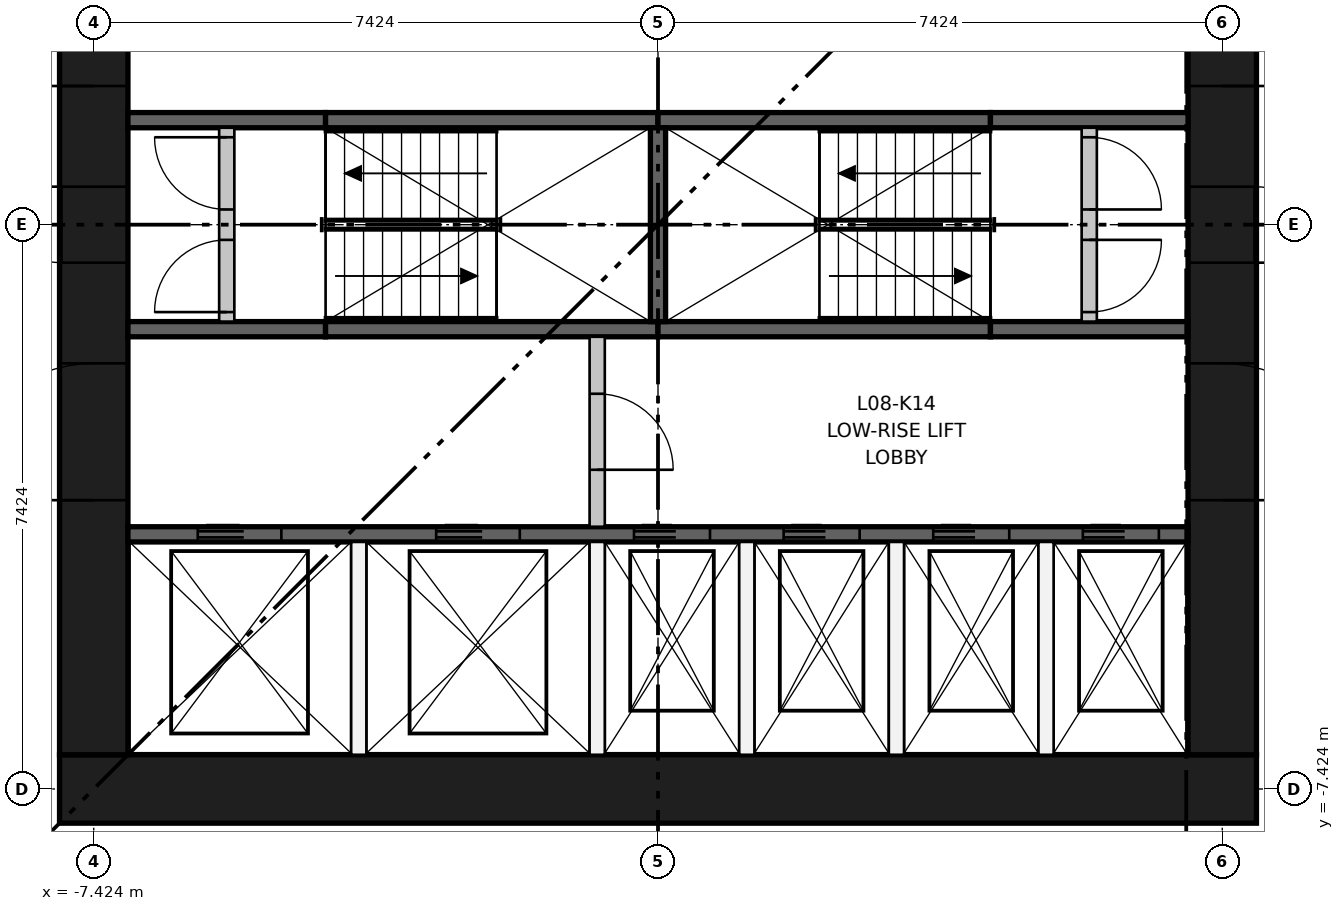
"""IFC4 building model, lengths in metres.
Left out: names, types, materials, properties, quantities, classifications, styles, units other than length and angle.
Written with IfcOpenShell. Run it as: python <this file> out.ifc"""

import sys

from ifc_helpers import new_model, si_unit, direction, frame, frame_2d, origin, place, context, subcontext, project, spatial, rectangle, extrude, element, fill, save


model = new_model("IFC4")
c1 = context("Model", 3, precision=1e-05, world=origin(), true_north=direction((0.0, 1.0)))
c2 = subcontext(c1, "Body", "Model", "MODEL_VIEW")
j1 = project(units=[si_unit("LENGTHUNIT", "METRE"), si_unit("PLANEANGLEUNIT", "RADIAN")], contexts=[c1])
p1 = place(None, origin())
s1 = spatial("IfcSite", under=j1, at=p1, CompositionType="ELEMENT")
p2 = place(p1, origin())
s2 = spatial("IfcBuilding", under=s1, at=p2, CompositionType="ELEMENT")
p3 = place(p2, frame((0.0, 0.0, 33.5)))
s3 = spatial("IfcBuildingStorey", under=s2, at=p3, CompositionType="ELEMENT", Elevation=33.5)
p4 = place(p3, frame((-7.874, -7.424, 0.0), z_axis=(0.0, 0.0, 1.0), x_axis=(1.0, 0.0, 0.0)))
e1 = element("IfcWall", 1, at=p4, inside=s3, PredefinedType="SHEAR", context=c2, shape_type="SweptSolid", body=[
    extrude(rectangle(XDim=15.748, YDim=0.9, at=frame_2d((7.874, 0.0))), origin(), (0.0, 0.0, 1.0), 3.65),
])
p5 = place(p3, frame((-7.424, -6.974, 0.0), z_axis=(0.0, 0.0, 1.0), x_axis=(0.0, 1.0, 0.0)))
e2 = element("IfcWall", 2, at=p5, inside=s3, PredefinedType="SHEAR", context=c2, shape_type="SweptSolid", body=[
    extrude(rectangle(XDim=13.948, YDim=0.9, at=frame_2d((6.974, 0.0))), origin(), (0.0, 0.0, 1.0), 3.65),
])
p6 = place(p5, frame((6.474, 0.0, 0.0)))
e3 = element("IfcOpeningElement", 3, at=p6, cuts=e2, PredefinedType="OPENING", context=c2, shape_type="SweptSolid", body=[
    extrude(rectangle(XDim=1.0, YDim=2.1, at=frame_2d((0.5, 1.05))), frame((0.0, 0.46, 0.0), z_axis=(0.0, -1.0, 0.0), x_axis=(1.0, 0.0, 0.0)), (0.0, 0.0, 1.0), 0.92),
])
p7 = place(p5, frame((3.35, 0.0, 0.0)))
e4 = element("IfcOpeningElement", 4, at=p7, cuts=e2, PredefinedType="OPENING", context=c2, shape_type="SweptSolid", body=[
    extrude(rectangle(XDim=1.8, YDim=2.1, at=frame_2d((0.9, 1.05))), frame((0.0, 0.46, 0.0), z_axis=(0.0, -1.0, 0.0), x_axis=(1.0, 0.0, 0.0)), (0.0, 0.0, 1.0), 0.92),
])
p8 = place(p5, frame((8.799, 0.0, 0.0)))
e5 = element("IfcOpeningElement", 5, at=p8, cuts=e2, PredefinedType="OPENING", context=c2, shape_type="SweptSolid", body=[
    extrude(rectangle(XDim=1.8, YDim=2.1, at=frame_2d((0.9, 1.05))), frame((0.0, 0.46, 0.0), z_axis=(0.0, -1.0, 0.0), x_axis=(1.0, 0.0, 0.0)), (0.0, 0.0, 1.0), 0.92),
])
p9 = place(p5, frame((11.974, 0.0, 0.0)))
e6 = element("IfcOpeningElement", 6, at=p9, cuts=e2, PredefinedType="OPENING", context=c2, shape_type="SweptSolid", body=[
    extrude(rectangle(XDim=1.0, YDim=2.1, at=frame_2d((0.5, 1.05))), frame((0.0, 0.46, 0.0), z_axis=(0.0, -1.0, 0.0), x_axis=(1.0, 0.0, 0.0)), (0.0, 0.0, 1.0), 0.92),
])
p10 = place(p3, frame((7.424, -6.974, 0.0), z_axis=(0.0, 0.0, 1.0), x_axis=(0.0, 1.0, 0.0)))
e7 = element("IfcWall", 7, at=p10, inside=s3, PredefinedType="SHEAR", context=c2, shape_type="SweptSolid", body=[
    extrude(rectangle(XDim=13.948, YDim=0.9, at=frame_2d((6.974, 0.0))), origin(), (0.0, 0.0, 1.0), 3.65),
])
p11 = place(p10, frame((6.474, 0.0, 0.0)))
e8 = element("IfcOpeningElement", 8, at=p11, cuts=e7, PredefinedType="OPENING", context=c2, shape_type="SweptSolid", body=[
    extrude(rectangle(XDim=1.0, YDim=2.1, at=frame_2d((0.5, 1.05))), frame((0.0, 0.46, 0.0), z_axis=(0.0, -1.0, 0.0), x_axis=(1.0, 0.0, 0.0)), (0.0, 0.0, 1.0), 0.92),
])
p12 = place(p10, frame((3.35, 0.0, 0.0)))
e9 = element("IfcOpeningElement", 9, at=p12, cuts=e7, PredefinedType="OPENING", context=c2, shape_type="SweptSolid", body=[
    extrude(rectangle(XDim=1.8, YDim=2.1, at=frame_2d((0.9, 1.05))), frame((0.0, 0.46, 0.0), z_axis=(0.0, -1.0, 0.0), x_axis=(1.0, 0.0, 0.0)), (0.0, 0.0, 1.0), 0.92),
])
p13 = place(p10, frame((8.799, 0.0, 0.0)))
e10 = element("IfcOpeningElement", 10, at=p13, cuts=e7, PredefinedType="OPENING", context=c2, shape_type="SweptSolid", body=[
    extrude(rectangle(XDim=1.8, YDim=2.1, at=frame_2d((0.9, 1.05))), frame((0.0, 0.46, 0.0), z_axis=(0.0, -1.0, 0.0), x_axis=(1.0, 0.0, 0.0)), (0.0, 0.0, 1.0), 0.92),
])
p14 = place(p3, frame((-6.974, -4.074, 0.0), z_axis=(0.0, 0.0, 1.0), x_axis=(1.0, 0.0, 0.0)))
e11 = element("IfcWall", 11, at=p14, inside=s3, PredefinedType="SHEAR", context=c2, shape_type="SweptSolid", body=[
    extrude(rectangle(XDim=13.948, YDim=0.2, at=frame_2d((6.974, 0.0))), origin(), (0.0, 0.0, 1.0), 3.3),
])
p15 = place(p14, frame((0.918, 0.0, 0.0)))
e12 = element("IfcOpeningElement", 12, at=p15, cuts=e11, PredefinedType="OPENING", context=c2, shape_type="SweptSolid", body=[
    extrude(rectangle(XDim=1.1, YDim=2.1, at=frame_2d((0.55, 1.05))), frame((0.0, 0.11, 0.0), z_axis=(0.0, -1.0, 0.0), x_axis=(1.0, 0.0, 0.0)), (0.0, 0.0, 1.0), 0.22),
])
p16 = place(p14, frame((4.055, 0.0, 0.0)))
e13 = element("IfcOpeningElement", 13, at=p16, cuts=e11, PredefinedType="OPENING", context=c2, shape_type="SweptSolid", body=[
    extrude(rectangle(XDim=1.1, YDim=2.1, at=frame_2d((0.55, 1.05))), frame((0.0, 0.11, 0.0), z_axis=(0.0, -1.0, 0.0), x_axis=(1.0, 0.0, 0.0)), (0.0, 0.0, 1.0), 0.22),
])
p17 = place(p14, frame((6.658, 0.0, 0.0)))
e14 = element("IfcOpeningElement", 14, at=p17, cuts=e11, PredefinedType="OPENING", context=c2, shape_type="SweptSolid", body=[
    extrude(rectangle(XDim=1.0, YDim=2.1, at=frame_2d((0.5, 1.05))), frame((0.0, 0.11, 0.0), z_axis=(0.0, -1.0, 0.0), x_axis=(1.0, 0.0, 0.0)), (0.0, 0.0, 1.0), 0.22),
])
p18 = place(p14, frame((8.627, 0.0, 0.0)))
e15 = element("IfcOpeningElement", 15, at=p18, cuts=e11, PredefinedType="OPENING", context=c2, shape_type="SweptSolid", body=[
    extrude(rectangle(XDim=1.0, YDim=2.1, at=frame_2d((0.5, 1.05))), frame((0.0, 0.11, 0.0), z_axis=(0.0, -1.0, 0.0), x_axis=(1.0, 0.0, 0.0)), (0.0, 0.0, 1.0), 0.22),
])
p19 = place(p14, frame((10.595, 0.0, 0.0)))
e16 = element("IfcOpeningElement", 16, at=p19, cuts=e11, PredefinedType="OPENING", context=c2, shape_type="SweptSolid", body=[
    extrude(rectangle(XDim=1.0, YDim=2.1, at=frame_2d((0.5, 1.05))), frame((0.0, 0.11, 0.0), z_axis=(0.0, -1.0, 0.0), x_axis=(1.0, 0.0, 0.0)), (0.0, 0.0, 1.0), 0.22),
])
p20 = place(p14, frame((12.564, 0.0, 0.0)))
e17 = element("IfcOpeningElement", 17, at=p20, cuts=e11, PredefinedType="OPENING", context=c2, shape_type="SweptSolid", body=[
    extrude(rectangle(XDim=1.0, YDim=2.1, at=frame_2d((0.5, 1.05))), frame((0.0, 0.11, 0.0), z_axis=(0.0, -1.0, 0.0), x_axis=(1.0, 0.0, 0.0)), (0.0, 0.0, 1.0), 0.22),
])
p21 = place(p3, frame((-6.974, -1.375, 0.0), z_axis=(0.0, 0.0, 1.0), x_axis=(1.0, 0.0, 0.0)))
e18 = element("IfcWall", 18, at=p21, inside=s3, PredefinedType="SHEAR", context=c2, shape_type="SweptSolid", body=[
    extrude(rectangle(XDim=2.6, YDim=0.2, at=frame_2d((1.3, 0.0))), origin(), (0.0, 0.0, 1.0), 3.3),
])
for number, where, z_axis, x_axis in (
    (19, (-4.374, -1.375, 0.0), (0.0, 0.0, 1.0), (1.0, 0.0, 0.0)),
    (20, (0.0, -1.375, 0.0), (0.0, 0.0, 1.0), (1.0, 0.0, 0.0)),
):
    element("IfcWall", number, at=place(p3, frame(where, z_axis=z_axis, x_axis=x_axis)), inside=s3, PredefinedType="SHEAR", context=c2, shape_type="SweptSolid", body=[
        extrude(rectangle(XDim=4.374, YDim=0.2, at=frame_2d((2.187, 0.0))), origin(), (0.0, 0.0, 1.0), 3.3),
    ])
for number, where, z_axis, x_axis in (
    (21, (4.374, -1.375, 0.0), (0.0, 0.0, 1.0), (1.0, 0.0, 0.0)),
    (22, (-6.974, 1.375, 0.0), (0.0, 0.0, 1.0), (1.0, 0.0, 0.0)),
):
    element("IfcWall", number, at=place(p3, frame(where, z_axis=z_axis, x_axis=x_axis)), inside=s3, PredefinedType="SHEAR", context=c2, shape_type="SweptSolid", body=[
        extrude(rectangle(XDim=2.6, YDim=0.2, at=frame_2d((1.3, 0.0))), origin(), (0.0, 0.0, 1.0), 3.3),
    ])
for number, where, z_axis, x_axis in (
    (23, (-4.374, 1.375, 0.0), (0.0, 0.0, 1.0), (1.0, 0.0, 0.0)),
    (24, (0.0, 1.375, 0.0), (0.0, 0.0, 1.0), (1.0, 0.0, 0.0)),
):
    element("IfcWall", number, at=place(p3, frame(where, z_axis=z_axis, x_axis=x_axis)), inside=s3, PredefinedType="SHEAR", context=c2, shape_type="SweptSolid", body=[
        extrude(rectangle(XDim=4.374, YDim=0.2, at=frame_2d((2.187, 0.0))), origin(), (0.0, 0.0, 1.0), 3.3),
    ])
p22 = place(p3, frame((4.374, 1.375, 0.0), z_axis=(0.0, 0.0, 1.0), x_axis=(1.0, 0.0, 0.0)))
e25 = element("IfcWall", 25, at=p22, inside=s3, PredefinedType="SHEAR", context=c2, shape_type="SweptSolid", body=[
    extrude(rectangle(XDim=2.6, YDim=0.2, at=frame_2d((1.3, 0.0))), origin(), (0.0, 0.0, 1.0), 3.3),
])
p23 = place(p3, frame((0.0, -1.275, 0.0), z_axis=(0.0, 0.0, 1.0), x_axis=(0.0, 1.0, 0.0)))
e26 = element("IfcWall", 26, at=p23, inside=s3, PredefinedType="SHEAR", context=c2, shape_type="SweptSolid", body=[
    extrude(rectangle(XDim=2.55, YDim=0.2, at=frame_2d((1.275, 0.0))), origin(), (0.0, 0.0, 1.0), 3.3),
])
for number, where, z_axis, x_axis in (
    (27, (-3.937, -6.974, 0.0), (0.0, 0.0, 1.0), (0.0, 1.0, 0.0)),
    (28, (-0.8, -6.974, 0.0), (0.0, 0.0, 1.0), (0.0, 1.0, 0.0)),
):
    element("IfcWall", number, at=place(p3, frame(where, z_axis=z_axis, x_axis=x_axis)), inside=s3, PredefinedType="PARTITIONING", context=c2, shape_type="SweptSolid", body=[
        extrude(rectangle(XDim=2.8, YDim=0.2, at=frame_2d((1.4, 0.0))), origin(), (0.0, 0.0, 1.0), 3.3),
    ])
p24 = place(p3, frame((-0.8, -3.974, 0.0), z_axis=(0.0, 0.0, 1.0), x_axis=(0.0, 1.0, 0.0)))
e29 = element("IfcWall", 29, at=p24, inside=s3, PredefinedType="PARTITIONING", context=c2, shape_type="SweptSolid", body=[
    extrude(rectangle(XDim=2.499, YDim=0.2, at=frame_2d((1.25, 0.0))), origin(), (0.0, 0.0, 1.0), 3.3),
])
p25 = place(p24, frame((0.75, 0.0, 0.0)))
e30 = element("IfcOpeningElement", 30, at=p25, cuts=e29, PredefinedType="OPENING", context=c2, shape_type="SweptSolid", body=[
    extrude(rectangle(XDim=1.0, YDim=2.1, at=frame_2d((0.5, 1.05))), frame((0.0, 0.11, 0.0), z_axis=(0.0, -1.0, 0.0), x_axis=(1.0, 0.0, 0.0)), (0.0, 0.0, 1.0), 0.22),
])
for number, where, z_axis, x_axis in (
    (31, (1.168, -6.974, 0.0), (0.0, 0.0, 1.0), (0.0, 1.0, 0.0)),
    (32, (3.137, -6.974, 0.0), (0.0, 0.0, 1.0), (0.0, 1.0, 0.0)),
    (33, (5.105, -6.974, 0.0), (0.0, 0.0, 1.0), (0.0, 1.0, 0.0)),
):
    element("IfcWall", number, at=place(p3, frame(where, z_axis=z_axis, x_axis=x_axis)), inside=s3, PredefinedType="PARTITIONING", context=c2, shape_type="SweptSolid", body=[
        extrude(rectangle(XDim=2.8, YDim=0.2, at=frame_2d((1.4, 0.0))), origin(), (0.0, 0.0, 1.0), 3.3),
    ])
p26 = place(p3, frame((-5.674, -1.275, 0.0), z_axis=(0.0, 0.0, 1.0), x_axis=(0.0, 1.0, 0.0)))
e34 = element("IfcWall", 34, at=p26, inside=s3, PredefinedType="PARTITIONING", context=c2, shape_type="SweptSolid", body=[
    extrude(rectangle(XDim=2.55, YDim=0.2, at=frame_2d((1.275, 0.0))), origin(), (0.0, 0.0, 1.0), 3.3),
])
p27 = place(p26, frame((0.125, 0.0, 0.0)))
e35 = element("IfcOpeningElement", 35, at=p27, cuts=e34, PredefinedType="OPENING", context=c2, shape_type="SweptSolid", body=[
    extrude(rectangle(XDim=0.95, YDim=2.1, at=frame_2d((0.475, 1.05))), frame((0.0, 0.11, 0.0), z_axis=(0.0, -1.0, 0.0), x_axis=(1.0, 0.0, 0.0)), (0.0, 0.0, 1.0), 0.22),
])
p28 = place(p26, frame((1.475, 0.0, 0.0)))
e36 = element("IfcOpeningElement", 36, at=p28, cuts=e34, PredefinedType="OPENING", context=c2, shape_type="SweptSolid", body=[
    extrude(rectangle(XDim=0.95, YDim=2.1, at=frame_2d((0.475, 1.05))), frame((0.0, 0.11, 0.0), z_axis=(0.0, -1.0, 0.0), x_axis=(1.0, 0.0, 0.0)), (0.0, 0.0, 1.0), 0.22),
])
p29 = place(p3, frame((5.674, -1.275, 0.0), z_axis=(0.0, 0.0, 1.0), x_axis=(0.0, 1.0, 0.0)))
e37 = element("IfcWall", 37, at=p29, inside=s3, PredefinedType="PARTITIONING", context=c2, shape_type="SweptSolid", body=[
    extrude(rectangle(XDim=2.55, YDim=0.2, at=frame_2d((1.275, 0.0))), origin(), (0.0, 0.0, 1.0), 3.3),
])
p30 = place(p29, frame((0.125, 0.0, 0.0)))
e38 = element("IfcOpeningElement", 38, at=p30, cuts=e37, PredefinedType="OPENING", context=c2, shape_type="SweptSolid", body=[
    extrude(rectangle(XDim=0.95, YDim=2.1, at=frame_2d((0.475, 1.05))), frame((0.0, 0.11, 0.0), z_axis=(0.0, -1.0, 0.0), x_axis=(1.0, 0.0, 0.0)), (0.0, 0.0, 1.0), 0.22),
])
p31 = place(p29, frame((1.475, 0.0, 0.0)))
e39 = element("IfcOpeningElement", 39, at=p31, cuts=e37, PredefinedType="OPENING", context=c2, shape_type="SweptSolid", body=[
    extrude(rectangle(XDim=0.95, YDim=2.1, at=frame_2d((0.475, 1.05))), frame((0.0, 0.11, 0.0), z_axis=(0.0, -1.0, 0.0), x_axis=(1.0, 0.0, 0.0)), (0.0, 0.0, 1.0), 0.22),
])
p32 = place(p15, origin())
e40 = element("IfcDoor", 40, at=p32, inside=s3, OperationType="DOUBLE_DOOR_SLIDING", PredefinedType="DOOR", context=c2, shape_type="SweptSolid", body=[
    extrude(rectangle(XDim=1.1, YDim=2.1, at=frame_2d((0.55, 1.05))), frame((0.0, 0.025, 0.0), z_axis=(0.0, -1.0, 0.0), x_axis=(1.0, 0.0, 0.0)), (0.0, 0.0, 1.0), 0.05),
])
fill(e12, e40)
p33 = place(p16, origin())
e41 = element("IfcDoor", 41, at=p33, inside=s3, OperationType="DOUBLE_DOOR_SLIDING", PredefinedType="DOOR", context=c2, shape_type="SweptSolid", body=[
    extrude(rectangle(XDim=1.1, YDim=2.1, at=frame_2d((0.55, 1.05))), frame((0.0, 0.025, 0.0), z_axis=(0.0, -1.0, 0.0), x_axis=(1.0, 0.0, 0.0)), (0.0, 0.0, 1.0), 0.05),
])
fill(e13, e41)
p34 = place(p17, origin())
e42 = element("IfcDoor", 42, at=p34, inside=s3, OperationType="DOUBLE_DOOR_SLIDING", PredefinedType="DOOR", context=c2, shape_type="SweptSolid", body=[
    extrude(rectangle(XDim=1.0, YDim=2.1, at=frame_2d((0.5, 1.05))), frame((0.0, 0.025, 0.0), z_axis=(0.0, -1.0, 0.0), x_axis=(1.0, 0.0, 0.0)), (0.0, 0.0, 1.0), 0.05),
])
fill(e14, e42)
p35 = place(p18, origin())
e43 = element("IfcDoor", 43, at=p35, inside=s3, OperationType="DOUBLE_DOOR_SLIDING", PredefinedType="DOOR", context=c2, shape_type="SweptSolid", body=[
    extrude(rectangle(XDim=1.0, YDim=2.1, at=frame_2d((0.5, 1.05))), frame((0.0, 0.025, 0.0), z_axis=(0.0, -1.0, 0.0), x_axis=(1.0, 0.0, 0.0)), (0.0, 0.0, 1.0), 0.05),
])
fill(e15, e43)
p36 = place(p19, origin())
e44 = element("IfcDoor", 44, at=p36, inside=s3, OperationType="DOUBLE_DOOR_SLIDING", PredefinedType="DOOR", context=c2, shape_type="SweptSolid", body=[
    extrude(rectangle(XDim=1.0, YDim=2.1, at=frame_2d((0.5, 1.05))), frame((0.0, 0.025, 0.0), z_axis=(0.0, -1.0, 0.0), x_axis=(1.0, 0.0, 0.0)), (0.0, 0.0, 1.0), 0.05),
])
fill(e16, e44)
p37 = place(p20, origin())
e45 = element("IfcDoor", 45, at=p37, inside=s3, OperationType="DOUBLE_DOOR_SLIDING", PredefinedType="DOOR", context=c2, shape_type="SweptSolid", body=[
    extrude(rectangle(XDim=1.0, YDim=2.1, at=frame_2d((0.5, 1.05))), frame((0.0, 0.025, 0.0), z_axis=(0.0, -1.0, 0.0), x_axis=(1.0, 0.0, 0.0)), (0.0, 0.0, 1.0), 0.05),
])
fill(e17, e45)
p38 = place(p27, origin())
e46 = element("IfcDoor", 46, at=p38, inside=s3, OperationType="SINGLE_SWING_LEFT", PredefinedType="DOOR", context=c2, shape_type="SweptSolid", body=[
    extrude(rectangle(XDim=0.95, YDim=2.1, at=frame_2d((0.475, 1.05))), frame((0.0, 0.025, 0.0), z_axis=(0.0, -1.0, 0.0), x_axis=(1.0, 0.0, 0.0)), (0.0, 0.0, 1.0), 0.05),
])
fill(e35, e46)
p39 = place(p28, origin())
e47 = element("IfcDoor", 47, at=p39, inside=s3, OperationType="SINGLE_SWING_RIGHT", PredefinedType="DOOR", context=c2, shape_type="SweptSolid", body=[
    extrude(rectangle(XDim=0.95, YDim=2.1, at=frame_2d((0.475, 1.05))), frame((0.0, 0.025, 0.0), z_axis=(0.0, -1.0, 0.0), x_axis=(1.0, 0.0, 0.0)), (0.0, 0.0, 1.0), 0.05),
])
fill(e36, e47)
p40 = place(p30, frame((0.95, 0.0, 0.0), z_axis=(0.0, 0.0, 1.0), x_axis=(-1.0, 0.0, 0.0)))
e48 = element("IfcDoor", 48, at=p40, inside=s3, OperationType="SINGLE_SWING_RIGHT", PredefinedType="DOOR", context=c2, shape_type="SweptSolid", body=[
    extrude(rectangle(XDim=0.95, YDim=2.1, at=frame_2d((0.475, 1.05))), frame((0.0, 0.025, 0.0), z_axis=(0.0, -1.0, 0.0), x_axis=(1.0, 0.0, 0.0)), (0.0, 0.0, 1.0), 0.05),
])
fill(e38, e48)
p41 = place(p31, frame((0.95, 0.0, 0.0), z_axis=(0.0, 0.0, 1.0), x_axis=(-1.0, 0.0, 0.0)))
e49 = element("IfcDoor", 49, at=p41, inside=s3, OperationType="SINGLE_SWING_LEFT", PredefinedType="DOOR", context=c2, shape_type="SweptSolid", body=[
    extrude(rectangle(XDim=0.95, YDim=2.1, at=frame_2d((0.475, 1.05))), frame((0.0, 0.025, 0.0), z_axis=(0.0, -1.0, 0.0), x_axis=(1.0, 0.0, 0.0)), (0.0, 0.0, 1.0), 0.05),
])
fill(e39, e49)
p42 = place(p25, frame((1.0, 0.0, 0.0), z_axis=(0.0, 0.0, 1.0), x_axis=(-1.0, 0.0, 0.0)))
e50 = element("IfcDoor", 50, at=p42, inside=s3, OperationType="SINGLE_SWING_LEFT", PredefinedType="DOOR", context=c2, shape_type="SweptSolid", body=[
    extrude(rectangle(XDim=1.0, YDim=2.1, at=frame_2d((0.5, 1.05))), frame((0.0, 0.025, 0.0), z_axis=(0.0, -1.0, 0.0), x_axis=(1.0, 0.0, 0.0)), (0.0, 0.0, 1.0), 0.05),
])
fill(e30, e50)
p43 = place(p6, origin())
e51 = element("IfcDoor", 51, at=p43, inside=s3, OperationType="SINGLE_SWING_RIGHT", PredefinedType="DOOR", context=c2, shape_type="SweptSolid", body=[
    extrude(rectangle(XDim=1.0, YDim=2.1, at=frame_2d((0.5, 1.05))), frame((0.0, 0.45, 0.0), z_axis=(0.0, -1.0, 0.0), x_axis=(1.0, 0.0, 0.0)), (0.0, 0.0, 1.0), 0.05),
])
fill(e3, e51)
p44 = place(p7, origin())
e52 = element("IfcDoor", 52, at=p44, inside=s3, OperationType="DOUBLE_DOOR_SINGLE_SWING", PredefinedType="DOOR", context=c2, shape_type="SweptSolid", body=[
    extrude(rectangle(XDim=1.8, YDim=2.1, at=frame_2d((0.9, 1.05))), frame((0.0, 0.025, 0.0), z_axis=(0.0, -1.0, 0.0), x_axis=(1.0, 0.0, 0.0)), (0.0, 0.0, 1.0), 0.05),
])
fill(e4, e52)
p45 = place(p8, origin())
e53 = element("IfcDoor", 53, at=p45, inside=s3, OperationType="DOUBLE_DOOR_SINGLE_SWING", PredefinedType="DOOR", context=c2, shape_type="SweptSolid", body=[
    extrude(rectangle(XDim=1.8, YDim=2.1, at=frame_2d((0.9, 1.05))), frame((0.0, 0.025, 0.0), z_axis=(0.0, -1.0, 0.0), x_axis=(1.0, 0.0, 0.0)), (0.0, 0.0, 1.0), 0.05),
])
fill(e5, e53)
p46 = place(p11, frame((1.0, 0.0, 0.0), z_axis=(0.0, 0.0, 1.0), x_axis=(-1.0, 0.0, 0.0)))
e54 = element("IfcDoor", 54, at=p46, inside=s3, OperationType="SINGLE_SWING_LEFT", PredefinedType="DOOR", context=c2, shape_type="SweptSolid", body=[
    extrude(rectangle(XDim=1.0, YDim=2.1, at=frame_2d((0.5, 1.05))), frame((0.0, 0.45, 0.0), z_axis=(0.0, -1.0, 0.0), x_axis=(1.0, 0.0, 0.0)), (0.0, 0.0, 1.0), 0.05),
])
fill(e8, e54)
p47 = place(p12, frame((1.8, 0.0, 0.0), z_axis=(0.0, 0.0, 1.0), x_axis=(-1.0, 0.0, 0.0)))
e55 = element("IfcDoor", 55, at=p47, inside=s3, OperationType="DOUBLE_DOOR_SINGLE_SWING", PredefinedType="DOOR", context=c2, shape_type="SweptSolid", body=[
    extrude(rectangle(XDim=1.8, YDim=2.1, at=frame_2d((0.9, 1.05))), frame((0.0, 0.025, 0.0), z_axis=(0.0, -1.0, 0.0), x_axis=(1.0, 0.0, 0.0)), (0.0, 0.0, 1.0), 0.05),
])
fill(e9, e55)
p48 = place(p13, frame((1.8, 0.0, 0.0), z_axis=(0.0, 0.0, 1.0), x_axis=(-1.0, 0.0, 0.0)))
e56 = element("IfcDoor", 56, at=p48, inside=s3, OperationType="DOUBLE_DOOR_SINGLE_SWING", PredefinedType="DOOR", context=c2, shape_type="SweptSolid", body=[
    extrude(rectangle(XDim=1.8, YDim=2.1, at=frame_2d((0.9, 1.05))), frame((0.0, 0.025, 0.0), z_axis=(0.0, -1.0, 0.0), x_axis=(1.0, 0.0, 0.0)), (0.0, 0.0, 1.0), 0.05),
])
fill(e10, e56)
save(model, sys.argv[1])
